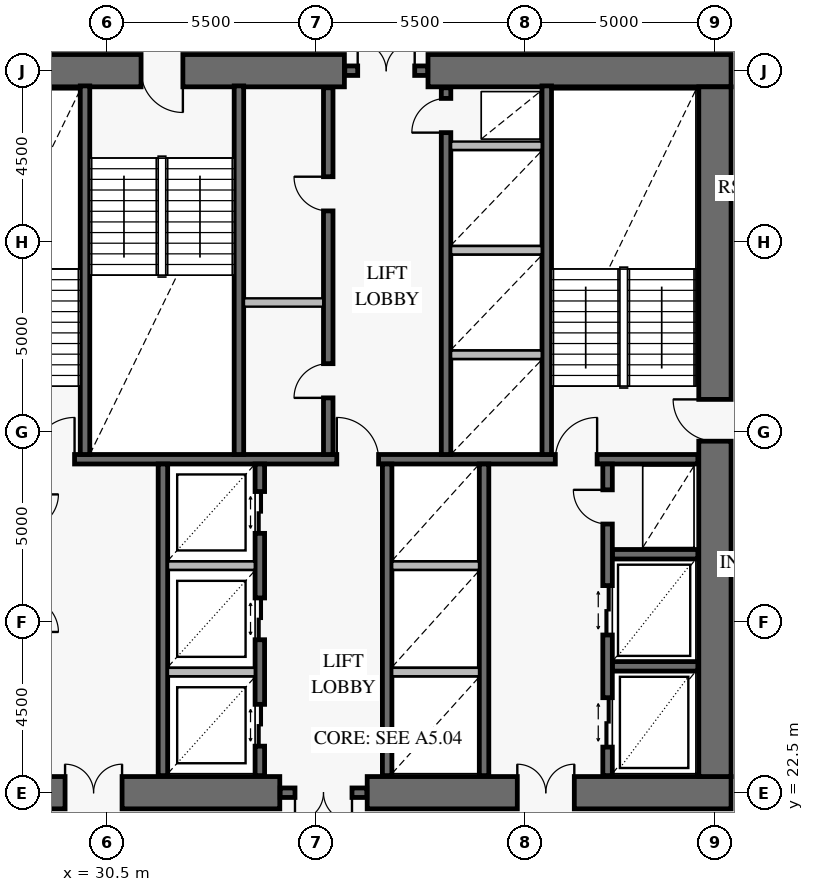
"""IFC4 building model, lengths in metres.
Left out: names, types, materials, properties, quantities, classifications, styles, units other than length and angle.
Written with IfcOpenShell. Run it as: python <this file> out.ifc"""

import sys

from ifc_helpers import new_model, si_unit, direction, frame, frame_2d, origin, place, context, subcontext, project, spatial, rectangle, extrude, element, fill, save


model = new_model("IFC4")
c1 = context("Model", 3, precision=1e-05, world=origin(), true_north=direction((0.0, 1.0)))
c2 = subcontext(c1, "Body", "Model", "MODEL_VIEW")
j1 = project(units=[si_unit("LENGTHUNIT", "METRE"), si_unit("PLANEANGLEUNIT", "RADIAN")], contexts=[c1])
p1 = place(None, origin())
s1 = spatial("IfcSite", under=j1, at=p1, CompositionType="ELEMENT")
p2 = place(p1, origin())
s2 = spatial("IfcBuilding", under=s1, at=p2, CompositionType="ELEMENT")
p3 = place(p2, frame((0.0, 0.0, 49.8)))
s3 = spatial("IfcBuildingStorey", under=s2, at=p3, CompositionType="ELEMENT", Elevation=49.8)
p4 = place(p3, frame((25.075, 22.5, 0.0), z_axis=(0.0, 0.0, 1.0), x_axis=(1.0, 0.0, 0.0)))
e1 = element("IfcWall", 1, at=p4, inside=s3, PredefinedType="SHEAR", context=c2, shape_type="SweptSolid", body=[
    extrude(rectangle(XDim=9.975, YDim=0.85, at=frame_2d((4.988, 0.0))), origin(), (0.0, 0.0, 1.0), 4.2),
])
p5 = place(p4, frame((4.325, 0.0, 0.0)))
e2 = element("IfcOpeningElement", 2, at=p5, cuts=e1, PredefinedType="OPENING", context=c2, shape_type="SweptSolid", body=[
    extrude(rectangle(XDim=1.5, YDim=2.15, at=frame_2d((0.75, 1.075))), frame((0.0, 0.437, 0.0), z_axis=(0.0, -1.0, 0.0), x_axis=(1.0, 0.0, 0.0)), (0.0, 0.0, 1.0), 0.874),
])
p6 = place(p3, frame((37.35, 22.5, 0.0), z_axis=(0.0, 0.0, 1.0), x_axis=(1.0, 0.0, 0.0)))
e3 = element("IfcWall", 3, at=p6, inside=s3, PredefinedType="SHEAR", context=c2, shape_type="SweptSolid", body=[
    extrude(rectangle(XDim=9.575, YDim=0.85, at=frame_2d((4.788, 0.0))), origin(), (0.0, 0.0, 1.0), 4.2),
])
p7 = place(p6, frame((3.95, 0.0, 0.0)))
e4 = element("IfcOpeningElement", 4, at=p7, cuts=e3, PredefinedType="OPENING", context=c2, shape_type="SweptSolid", body=[
    extrude(rectangle(XDim=1.5, YDim=2.15, at=frame_2d((0.75, 1.075))), frame((0.0, 0.437, 0.0), z_axis=(0.0, -1.0, 0.0), x_axis=(1.0, 0.0, 0.0)), (0.0, 0.0, 1.0), 0.874),
])
p8 = place(p3, frame((46.925, 41.5, 0.0), z_axis=(0.0, 0.0, 1.0), x_axis=(-1.0, 0.0, 0.0)))
e5 = element("IfcWall", 5, at=p8, inside=s3, PredefinedType="SHEAR", context=c2, shape_type="SweptSolid", body=[
    extrude(rectangle(XDim=7.975, YDim=0.85, at=frame_2d((3.988, 0.0))), origin(), (0.0, 0.0, 1.0), 4.2),
])
p9 = place(p3, frame((36.75, 41.5, 0.0), z_axis=(0.0, 0.0, 1.0), x_axis=(-1.0, 0.0, 0.0)))
e6 = element("IfcWall", 6, at=p9, inside=s3, PredefinedType="SHEAR", context=c2, shape_type="SweptSolid", body=[
    extrude(rectangle(XDim=11.675, YDim=0.85, at=frame_2d((5.837, 0.0))), origin(), (0.0, 0.0, 1.0), 4.2),
])
p10 = place(p9, frame((4.25, 0.0, 0.0)))
e7 = element("IfcOpeningElement", 7, at=p10, cuts=e6, PredefinedType="OPENING", context=c2, shape_type="SweptSolid", body=[
    extrude(rectangle(XDim=1.1, YDim=2.15, at=frame_2d((0.55, 1.075))), frame((0.0, 0.437, 0.0), z_axis=(0.0, -1.0, 0.0), x_axis=(1.0, 0.0, 0.0)), (0.0, 0.0, 1.0), 0.874),
])
p11 = place(p3, frame((46.5, 22.925, 0.0), z_axis=(0.0, 0.0, 1.0), x_axis=(0.0, 1.0, 0.0)))
e8 = element("IfcWall", 8, at=p11, inside=s3, PredefinedType="SHEAR", context=c2, shape_type="SweptSolid", body=[
    extrude(rectangle(XDim=18.15, YDim=0.85, at=frame_2d((9.075, 0.0))), origin(), (0.0, 0.0, 1.0), 4.2),
])
p12 = place(p11, frame((8.825, 0.0, 0.0)))
e9 = element("IfcOpeningElement", 9, at=p12, cuts=e8, PredefinedType="OPENING", context=c2, shape_type="SweptSolid", body=[
    extrude(rectangle(XDim=1.1, YDim=2.15, at=frame_2d((0.55, 1.075))), frame((0.0, 0.437, 0.0), z_axis=(0.0, -1.0, 0.0), x_axis=(1.0, 0.0, 0.0)), (0.0, 0.0, 1.0), 0.874),
])
p13 = place(p3, frame((35.06, 22.5, 0.0), z_axis=(0.0, 0.0, 1.0), x_axis=(1.0, 0.0, 0.0)))
e10 = element("IfcWall", 10, at=p13, inside=s3, PredefinedType="SOLIDWALL", context=c2, shape_type="SweptSolid", body=[
    extrude(rectangle(XDim=2.28, YDim=0.25, at=frame_2d((1.14, 0.0))), origin(), (0.0, 0.0, 1.0), 4.2),
])
p14 = place(p13, frame((0.39, 0.0, 0.0)))
e11 = element("IfcOpeningElement", 11, at=p14, cuts=e10, PredefinedType="OPENING", context=c2, shape_type="SweptSolid", body=[
    extrude(rectangle(XDim=1.5, YDim=2.15, at=frame_2d((0.75, 1.075))), frame((0.0, 0.137, 0.0), z_axis=(0.0, -1.0, 0.0), x_axis=(1.0, 0.0, 0.0)), (0.0, 0.0, 1.0), 0.274),
])
p15 = place(p3, frame((36.76, 41.5, 0.0), z_axis=(0.0, 0.0, 1.0), x_axis=(1.0, 0.0, 0.0)))
e12 = element("IfcWall", 12, at=p15, inside=s3, PredefinedType="SOLIDWALL", context=c2, shape_type="SweptSolid", body=[
    extrude(rectangle(XDim=2.18, YDim=0.25, at=frame_2d((1.09, 0.0))), origin(), (0.0, 0.0, 1.0), 4.2),
])
p16 = place(p15, frame((0.34, 0.0, 0.0)))
e13 = element("IfcOpeningElement", 13, at=p16, cuts=e12, PredefinedType="OPENING", context=c2, shape_type="SweptSolid", body=[
    extrude(rectangle(XDim=1.5, YDim=2.15, at=frame_2d((0.75, 1.075))), frame((0.0, 0.137, 0.0), z_axis=(0.0, -1.0, 0.0), x_axis=(1.0, 0.0, 0.0)), (0.0, 0.0, 1.0), 0.274),
])
p17 = place(p3, frame((25.95, 31.275, 0.0), z_axis=(0.0, 0.0, 1.0), x_axis=(1.0, 0.0, 0.0)))
e14 = element("IfcWall", 14, at=p17, inside=s3, PredefinedType="SOLIDWALL", context=c2, shape_type="SweptSolid", body=[
    extrude(rectangle(XDim=20.1, YDim=0.25, at=frame_2d((10.05, 0.0))), origin(), (0.0, 0.0, 1.0), 4.2),
])
p18 = place(p17, frame((2.6, 0.0, 0.0)))
e15 = element("IfcOpeningElement", 15, at=p18, cuts=e14, PredefinedType="OPENING", context=c2, shape_type="SweptSolid", body=[
    extrude(rectangle(XDim=1.1, YDim=2.15, at=frame_2d((0.55, 1.075))), frame((0.0, 0.137, 0.0), z_axis=(0.0, -1.0, 0.0), x_axis=(1.0, 0.0, 0.0)), (0.0, 0.0, 1.0), 0.274),
])
p19 = place(p17, frame((10.6, 0.0, 0.0)))
e16 = element("IfcOpeningElement", 16, at=p19, cuts=e14, PredefinedType="OPENING", context=c2, shape_type="SweptSolid", body=[
    extrude(rectangle(XDim=1.1, YDim=2.15, at=frame_2d((0.55, 1.075))), frame((0.0, 0.137, 0.0), z_axis=(0.0, -1.0, 0.0), x_axis=(1.0, 0.0, 0.0)), (0.0, 0.0, 1.0), 0.274),
])
p20 = place(p17, frame((16.35, 0.0, 0.0)))
e17 = element("IfcOpeningElement", 17, at=p20, cuts=e14, PredefinedType="OPENING", context=c2, shape_type="SweptSolid", body=[
    extrude(rectangle(XDim=1.1, YDim=2.15, at=frame_2d((0.55, 1.075))), frame((0.0, 0.137, 0.0), z_axis=(0.0, -1.0, 0.0), x_axis=(1.0, 0.0, 0.0)), (0.0, 0.0, 1.0), 0.274),
])
for number, where, z_axis, x_axis in (
    (18, (29.925, 31.4, 0.0), (0.0, 0.0, 1.0), (0.0, 1.0, 0.0)),
    (19, (33.975, 31.4, 0.0), (0.0, 0.0, 1.0), (0.0, 1.0, 0.0)),
    (20, (42.075, 31.4, 0.0), (0.0, 0.0, 1.0), (0.0, 1.0, 0.0)),
):
    element("IfcWall", number, at=place(p3, frame(where, z_axis=z_axis, x_axis=x_axis)), inside=s3, PredefinedType="SOLIDWALL", context=c2, shape_type="SweptSolid", body=[
        extrude(rectangle(XDim=9.7, YDim=0.25, at=frame_2d((4.85, 0.0))), origin(), (0.0, 0.0, 1.0), 4.2),
    ])
p21 = place(p3, frame((36.325, 31.4, 0.0), z_axis=(0.0, 0.0, 1.0), x_axis=(0.0, 1.0, 0.0)))
e21 = element("IfcWall", 21, at=p21, inside=s3, PredefinedType="SOLIDWALL", context=c2, shape_type="SweptSolid", body=[
    extrude(rectangle(XDim=9.65, YDim=0.25, at=frame_2d((4.825, 0.0))), origin(), (0.0, 0.0, 1.0), 4.2),
])
p22 = place(p21, frame((1.49, 0.0, 0.0)))
e22 = element("IfcOpeningElement", 22, at=p22, cuts=e21, PredefinedType="OPENING", context=c2, shape_type="SweptSolid", body=[
    extrude(rectangle(XDim=0.9, YDim=2.1, at=frame_2d((0.45, 1.05))), frame((0.0, 0.137, 0.0), z_axis=(0.0, -1.0, 0.0), x_axis=(1.0, 0.0, 0.0)), (0.0, 0.0, 1.0), 0.274),
])
p23 = place(p21, frame((6.41, 0.0, 0.0)))
e23 = element("IfcOpeningElement", 23, at=p23, cuts=e21, PredefinedType="OPENING", context=c2, shape_type="SweptSolid", body=[
    extrude(rectangle(XDim=0.9, YDim=2.1, at=frame_2d((0.45, 1.05))), frame((0.0, 0.137, 0.0), z_axis=(0.0, -1.0, 0.0), x_axis=(1.0, 0.0, 0.0)), (0.0, 0.0, 1.0), 0.274),
])
p24 = place(p3, frame((39.425, 31.4, 0.0), z_axis=(0.0, 0.0, 1.0), x_axis=(0.0, 1.0, 0.0)))
e24 = element("IfcWall", 24, at=p24, inside=s3, PredefinedType="SOLIDWALL", context=c2, shape_type="SweptSolid", body=[
    extrude(rectangle(XDim=9.65, YDim=0.25, at=frame_2d((4.825, 0.0))), origin(), (0.0, 0.0, 1.0), 4.2),
])
p25 = place(p24, frame((8.47, 0.0, 0.0)))
e25 = element("IfcOpeningElement", 25, at=p25, cuts=e24, PredefinedType="OPENING", context=c2, shape_type="SweptSolid", body=[
    extrude(rectangle(XDim=0.9, YDim=2.1, at=frame_2d((0.45, 1.05))), frame((0.0, 0.137, 0.0), z_axis=(0.0, -1.0, 0.0), x_axis=(1.0, 0.0, 0.0)), (0.0, 0.0, 1.0), 0.274),
])
p26 = place(p3, frame((31.975, 22.95, 0.0), z_axis=(0.0, 0.0, 1.0), x_axis=(0.0, 1.0, 0.0)))
e26 = element("IfcWall", 26, at=p26, inside=s3, PredefinedType="SOLIDWALL", context=c2, shape_type="SweptSolid", body=[
    extrude(rectangle(XDim=8.2, YDim=0.25, at=frame_2d((4.1, 0.0))), origin(), (0.0, 0.0, 1.0), 4.2),
])
p27 = place(p3, frame((34.525, 22.95, 0.0), z_axis=(0.0, 0.0, 1.0), x_axis=(0.0, 1.0, 0.0)))
e27 = element("IfcWall", 27, at=p27, inside=s3, PredefinedType="SOLIDWALL", context=c2, shape_type="SweptSolid", body=[
    extrude(rectangle(XDim=8.2, YDim=0.25, at=frame_2d((4.1, 0.0))), origin(), (0.0, 0.0, 1.0), 4.2),
])
p28 = place(p27, frame((0.775, 0.0, 0.0)))
e28 = element("IfcOpeningElement", 28, at=p28, cuts=e27, PredefinedType="OPENING", context=c2, shape_type="SweptSolid", body=[
    extrude(rectangle(XDim=1.1, YDim=2.2, at=frame_2d((0.55, 1.1))), frame((0.0, 0.137, 0.0), z_axis=(0.0, -1.0, 0.0), x_axis=(1.0, 0.0, 0.0)), (0.0, 0.0, 1.0), 0.274),
])
p29 = place(p27, frame((3.575, 0.0, 0.0)))
e29 = element("IfcOpeningElement", 29, at=p29, cuts=e27, PredefinedType="OPENING", context=c2, shape_type="SweptSolid", body=[
    extrude(rectangle(XDim=1.1, YDim=2.2, at=frame_2d((0.55, 1.1))), frame((0.0, 0.137, 0.0), z_axis=(0.0, -1.0, 0.0), x_axis=(1.0, 0.0, 0.0)), (0.0, 0.0, 1.0), 0.274),
])
p30 = place(p27, frame((6.375, 0.0, 0.0)))
e30 = element("IfcOpeningElement", 30, at=p30, cuts=e27, PredefinedType="OPENING", context=c2, shape_type="SweptSolid", body=[
    extrude(rectangle(XDim=1.1, YDim=2.2, at=frame_2d((0.55, 1.1))), frame((0.0, 0.137, 0.0), z_axis=(0.0, -1.0, 0.0), x_axis=(1.0, 0.0, 0.0)), (0.0, 0.0, 1.0), 0.274),
])
for number, where, z_axis, x_axis in (
    (31, (37.875, 22.95, 0.0), (0.0, 0.0, 1.0), (0.0, 1.0, 0.0)),
    (32, (40.425, 22.95, 0.0), (0.0, 0.0, 1.0), (0.0, 1.0, 0.0)),
):
    element("IfcWall", number, at=place(p3, frame(where, z_axis=z_axis, x_axis=x_axis)), inside=s3, PredefinedType="SOLIDWALL", context=c2, shape_type="SweptSolid", body=[
        extrude(rectangle(XDim=8.2, YDim=0.25, at=frame_2d((4.1, 0.0))), origin(), (0.0, 0.0, 1.0), 4.2),
    ])
for number, where, z_axis, x_axis in (
    (33, (43.8, 25.825, 0.0), (0.0, 0.0, 1.0), (1.0, 0.0, 0.0)),
    (34, (43.8, 28.775, 0.0), (0.0, 0.0, 1.0), (1.0, 0.0, 0.0)),
):
    element("IfcWall", number, at=place(p3, frame(where, z_axis=z_axis, x_axis=x_axis)), inside=s3, PredefinedType="SOLIDWALL", context=c2, shape_type="SweptSolid", body=[
        extrude(rectangle(XDim=2.25, YDim=0.25, at=frame_2d((1.125, 0.0))), origin(), (0.0, 0.0, 1.0), 4.2),
    ])
p31 = place(p3, frame((43.675, 22.95, 0.0), z_axis=(0.0, 0.0, 1.0), x_axis=(0.0, 1.0, 0.0)))
e35 = element("IfcWall", 35, at=p31, inside=s3, PredefinedType="SOLIDWALL", context=c2, shape_type="SweptSolid", body=[
    extrude(rectangle(XDim=8.2, YDim=0.25, at=frame_2d((4.1, 0.0))), origin(), (0.0, 0.0, 1.0), 4.2),
])
p32 = place(p31, frame((0.75, 0.0, 0.0)))
e36 = element("IfcOpeningElement", 36, at=p32, cuts=e35, PredefinedType="OPENING", context=c2, shape_type="SweptSolid", body=[
    extrude(rectangle(XDim=1.3, YDim=2.3, at=frame_2d((0.65, 1.15))), frame((0.0, 0.137, 0.0), z_axis=(0.0, -1.0, 0.0), x_axis=(1.0, 0.0, 0.0)), (0.0, 0.0, 1.0), 0.274),
])
p33 = place(p31, frame((3.7, 0.0, 0.0)))
e37 = element("IfcOpeningElement", 37, at=p33, cuts=e35, PredefinedType="OPENING", context=c2, shape_type="SweptSolid", body=[
    extrude(rectangle(XDim=1.3, YDim=2.3, at=frame_2d((0.65, 1.15))), frame((0.0, 0.137, 0.0), z_axis=(0.0, -1.0, 0.0), x_axis=(1.0, 0.0, 0.0)), (0.0, 0.0, 1.0), 0.274),
])
p34 = place(p31, frame((6.62, 0.0, 0.0)))
e38 = element("IfcOpeningElement", 38, at=p34, cuts=e35, PredefinedType="OPENING", context=c2, shape_type="SweptSolid", body=[
    extrude(rectangle(XDim=0.9, YDim=2.1, at=frame_2d((0.45, 1.05))), frame((0.0, 0.137, 0.0), z_axis=(0.0, -1.0, 0.0), x_axis=(1.0, 0.0, 0.0)), (0.0, 0.0, 1.0), 0.274),
])
p35 = place(p3, frame((34.108, 35.4, 0.0), z_axis=(0.0, 0.0, 1.0), x_axis=(1.0, 0.0, 0.0)))
e39 = element("IfcWall", 39, at=p35, inside=s3, PredefinedType="PARTITIONING", context=c2, shape_type="SweptSolid", body=[
    extrude(rectangle(XDim=2.084, YDim=0.22, at=frame_2d((1.042, 0.0))), origin(), (0.0, 0.0, 1.0), 3.92),
])
for number, where, z_axis, x_axis in (
    (40, (39.558, 34.025, 0.0), (0.0, 0.0, 1.0), (1.0, 0.0, 0.0)),
    (41, (39.558, 36.775, 0.0), (0.0, 0.0, 1.0), (1.0, 0.0, 0.0)),
    (42, (39.558, 39.525, 0.0), (0.0, 0.0, 1.0), (1.0, 0.0, 0.0)),
):
    element("IfcWall", number, at=place(p3, frame(where, z_axis=z_axis, x_axis=x_axis)), inside=s3, PredefinedType="PARTITIONING", context=c2, shape_type="SweptSolid", body=[
        extrude(rectangle(XDim=2.384, YDim=0.22, at=frame_2d((1.192, 0.0))), origin(), (0.0, 0.0, 1.0), 3.92),
    ])
for number, where, z_axis, x_axis in (
    (43, (32.108, 25.675, 0.0), (0.0, 0.0, 1.0), (1.0, 0.0, 0.0)),
    (44, (32.108, 28.475, 0.0), (0.0, 0.0, 1.0), (1.0, 0.0, 0.0)),
):
    element("IfcWall", number, at=place(p3, frame(where, z_axis=z_axis, x_axis=x_axis)), inside=s3, PredefinedType="PARTITIONING", context=c2, shape_type="SweptSolid", body=[
        extrude(rectangle(XDim=2.284, YDim=0.22, at=frame_2d((1.142, 0.0))), origin(), (0.0, 0.0, 1.0), 3.92),
    ])
for number, where, z_axis, x_axis in (
    (45, (38.008, 25.675, 0.0), (0.0, 0.0, 1.0), (1.0, 0.0, 0.0)),
    (46, (38.008, 28.475, 0.0), (0.0, 0.0, 1.0), (1.0, 0.0, 0.0)),
):
    element("IfcWall", number, at=place(p3, frame(where, z_axis=z_axis, x_axis=x_axis)), inside=s3, PredefinedType="PARTITIONING", context=c2, shape_type="SweptSolid", body=[
        extrude(rectangle(XDim=2.284, YDim=0.22, at=frame_2d((1.142, 0.0))), origin(), (0.0, 0.0, 1.0), 3.92),
    ])
p36 = place(p12, origin())
e47 = element("IfcDoor", 47, at=p36, inside=s3, OperationType="SINGLE_SWING_RIGHT", PredefinedType="USERDEFINED", context=c2, shape_type="SweptSolid", body=[
    extrude(rectangle(XDim=1.1, YDim=2.15, at=frame_2d((0.55, 1.075))), frame((0.0, 0.025, 0.0), z_axis=(0.0, -1.0, 0.0), x_axis=(1.0, 0.0, 0.0)), (0.0, 0.0, 1.0), 0.05),
])
fill(e9, e47)
p37 = place(p10, origin())
e48 = element("IfcDoor", 48, at=p37, inside=s3, OperationType="SINGLE_SWING_LEFT", PredefinedType="USERDEFINED", context=c2, shape_type="SweptSolid", body=[
    extrude(rectangle(XDim=1.1, YDim=2.15, at=frame_2d((0.55, 1.075))), frame((0.0, 0.025, 0.0), z_axis=(0.0, -1.0, 0.0), x_axis=(1.0, 0.0, 0.0)), (0.0, 0.0, 1.0), 0.05),
])
fill(e7, e48)
p38 = place(p5, origin())
e49 = element("IfcDoor", 49, at=p38, inside=s3, OperationType="DOUBLE_DOOR_SINGLE_SWING", PredefinedType="DOOR", context=c2, shape_type="SweptSolid", body=[
    extrude(rectangle(XDim=1.5, YDim=2.15, at=frame_2d((0.75, 1.075))), frame((0.0, 0.025, 0.0), z_axis=(0.0, -1.0, 0.0), x_axis=(1.0, 0.0, 0.0)), (0.0, 0.0, 1.0), 0.05),
])
fill(e2, e49)
p39 = place(p7, origin())
e50 = element("IfcDoor", 50, at=p39, inside=s3, OperationType="DOUBLE_DOOR_SINGLE_SWING", PredefinedType="DOOR", context=c2, shape_type="SweptSolid", body=[
    extrude(rectangle(XDim=1.5, YDim=2.15, at=frame_2d((0.75, 1.075))), frame((0.0, 0.025, 0.0), z_axis=(0.0, -1.0, 0.0), x_axis=(1.0, 0.0, 0.0)), (0.0, 0.0, 1.0), 0.05),
])
fill(e4, e50)
p40 = place(p14, frame((1.5, 0.0, 0.0), z_axis=(0.0, 0.0, 1.0), x_axis=(-1.0, 0.0, 0.0)))
e51 = element("IfcDoor", 51, at=p40, inside=s3, OperationType="DOUBLE_DOOR_SINGLE_SWING", PredefinedType="DOOR", context=c2, shape_type="SweptSolid", body=[
    extrude(rectangle(XDim=1.5, YDim=2.15, at=frame_2d((0.75, 1.075))), frame((0.0, 0.025, 0.0), z_axis=(0.0, -1.0, 0.0), x_axis=(1.0, 0.0, 0.0)), (0.0, 0.0, 1.0), 0.05),
])
fill(e11, e51)
p41 = place(p16, origin())
e52 = element("IfcDoor", 52, at=p41, inside=s3, OperationType="DOUBLE_DOOR_SINGLE_SWING", PredefinedType="DOOR", context=c2, shape_type="SweptSolid", body=[
    extrude(rectangle(XDim=1.5, YDim=2.15, at=frame_2d((0.75, 1.075))), frame((0.0, 0.025, 0.0), z_axis=(0.0, -1.0, 0.0), x_axis=(1.0, 0.0, 0.0)), (0.0, 0.0, 1.0), 0.05),
])
fill(e13, e52)
p42 = place(p18, origin())
e53 = element("IfcDoor", 53, at=p42, inside=s3, OperationType="SINGLE_SWING_RIGHT", PredefinedType="USERDEFINED", context=c2, shape_type="SweptSolid", body=[
    extrude(rectangle(XDim=1.1, YDim=2.15, at=frame_2d((0.55, 1.075))), frame((0.0, 0.025, 0.0), z_axis=(0.0, -1.0, 0.0), x_axis=(1.0, 0.0, 0.0)), (0.0, 0.0, 1.0), 0.05),
])
fill(e15, e53)
p43 = place(p19, origin())
e54 = element("IfcDoor", 54, at=p43, inside=s3, OperationType="SINGLE_SWING_LEFT", PredefinedType="USERDEFINED", context=c2, shape_type="SweptSolid", body=[
    extrude(rectangle(XDim=1.1, YDim=2.15, at=frame_2d((0.55, 1.075))), frame((0.0, 0.025, 0.0), z_axis=(0.0, -1.0, 0.0), x_axis=(1.0, 0.0, 0.0)), (0.0, 0.0, 1.0), 0.05),
])
fill(e16, e54)
p44 = place(p20, origin())
e55 = element("IfcDoor", 55, at=p44, inside=s3, OperationType="SINGLE_SWING_RIGHT", PredefinedType="USERDEFINED", context=c2, shape_type="SweptSolid", body=[
    extrude(rectangle(XDim=1.1, YDim=2.15, at=frame_2d((0.55, 1.075))), frame((0.0, 0.025, 0.0), z_axis=(0.0, -1.0, 0.0), x_axis=(1.0, 0.0, 0.0)), (0.0, 0.0, 1.0), 0.05),
])
fill(e17, e55)
p45 = place(p22, origin())
e56 = element("IfcDoor", 56, at=p45, inside=s3, OperationType="SINGLE_SWING_LEFT", PredefinedType="DOOR", context=c2, shape_type="SweptSolid", body=[
    extrude(rectangle(XDim=0.9, YDim=2.1, at=frame_2d((0.45, 1.05))), frame((0.0, 0.025, 0.0), z_axis=(0.0, -1.0, 0.0), x_axis=(1.0, 0.0, 0.0)), (0.0, 0.0, 1.0), 0.05),
])
fill(e22, e56)
p46 = place(p23, origin())
e57 = element("IfcDoor", 57, at=p46, inside=s3, OperationType="SINGLE_SWING_RIGHT", PredefinedType="DOOR", context=c2, shape_type="SweptSolid", body=[
    extrude(rectangle(XDim=0.9, YDim=2.1, at=frame_2d((0.45, 1.05))), frame((0.0, 0.025, 0.0), z_axis=(0.0, -1.0, 0.0), x_axis=(1.0, 0.0, 0.0)), (0.0, 0.0, 1.0), 0.05),
])
fill(e23, e57)
p47 = place(p25, origin())
e58 = element("IfcDoor", 58, at=p47, inside=s3, OperationType="SINGLE_SWING_LEFT", PredefinedType="DOOR", context=c2, shape_type="SweptSolid", body=[
    extrude(rectangle(XDim=0.9, YDim=2.1, at=frame_2d((0.45, 1.05))), frame((0.0, 0.025, 0.0), z_axis=(0.0, -1.0, 0.0), x_axis=(1.0, 0.0, 0.0)), (0.0, 0.0, 1.0), 0.05),
])
fill(e25, e58)
p48 = place(p28, frame((1.1, 0.0, 0.0), z_axis=(0.0, 0.0, 1.0), x_axis=(-1.0, 0.0, 0.0)))
e59 = element("IfcDoor", 59, at=p48, inside=s3, OperationType="DOUBLE_DOOR_SLIDING", PredefinedType="DOOR", context=c2, shape_type="SweptSolid", body=[
    extrude(rectangle(XDim=1.1, YDim=2.2, at=frame_2d((0.55, 1.1))), frame((0.0, 0.025, 0.0), z_axis=(0.0, -1.0, 0.0), x_axis=(1.0, 0.0, 0.0)), (0.0, 0.0, 1.0), 0.05),
])
fill(e28, e59)
p49 = place(p29, frame((1.1, 0.0, 0.0), z_axis=(0.0, 0.0, 1.0), x_axis=(-1.0, 0.0, 0.0)))
e60 = element("IfcDoor", 60, at=p49, inside=s3, OperationType="DOUBLE_DOOR_SLIDING", PredefinedType="DOOR", context=c2, shape_type="SweptSolid", body=[
    extrude(rectangle(XDim=1.1, YDim=2.2, at=frame_2d((0.55, 1.1))), frame((0.0, 0.025, 0.0), z_axis=(0.0, -1.0, 0.0), x_axis=(1.0, 0.0, 0.0)), (0.0, 0.0, 1.0), 0.05),
])
fill(e29, e60)
p50 = place(p30, frame((1.1, 0.0, 0.0), z_axis=(0.0, 0.0, 1.0), x_axis=(-1.0, 0.0, 0.0)))
e61 = element("IfcDoor", 61, at=p50, inside=s3, OperationType="DOUBLE_DOOR_SLIDING", PredefinedType="DOOR", context=c2, shape_type="SweptSolid", body=[
    extrude(rectangle(XDim=1.1, YDim=2.2, at=frame_2d((0.55, 1.1))), frame((0.0, 0.025, 0.0), z_axis=(0.0, -1.0, 0.0), x_axis=(1.0, 0.0, 0.0)), (0.0, 0.0, 1.0), 0.05),
])
fill(e30, e61)
p51 = place(p32, origin())
e62 = element("IfcDoor", 62, at=p51, inside=s3, OperationType="DOUBLE_DOOR_SLIDING", PredefinedType="DOOR", context=c2, shape_type="SweptSolid", body=[
    extrude(rectangle(XDim=1.3, YDim=2.3, at=frame_2d((0.65, 1.15))), frame((0.0, 0.025, 0.0), z_axis=(0.0, -1.0, 0.0), x_axis=(1.0, 0.0, 0.0)), (0.0, 0.0, 1.0), 0.05),
])
fill(e36, e62)
p52 = place(p33, origin())
e63 = element("IfcDoor", 63, at=p52, inside=s3, OperationType="DOUBLE_DOOR_SLIDING", PredefinedType="DOOR", context=c2, shape_type="SweptSolid", body=[
    extrude(rectangle(XDim=1.3, YDim=2.3, at=frame_2d((0.65, 1.15))), frame((0.0, 0.025, 0.0), z_axis=(0.0, -1.0, 0.0), x_axis=(1.0, 0.0, 0.0)), (0.0, 0.0, 1.0), 0.05),
])
fill(e37, e63)
p53 = place(p34, origin())
e64 = element("IfcDoor", 64, at=p53, inside=s3, OperationType="SINGLE_SWING_RIGHT", PredefinedType="DOOR", context=c2, shape_type="SweptSolid", body=[
    extrude(rectangle(XDim=0.9, YDim=2.1, at=frame_2d((0.45, 1.05))), frame((0.0, 0.025, 0.0), z_axis=(0.0, -1.0, 0.0), x_axis=(1.0, 0.0, 0.0)), (0.0, 0.0, 1.0), 0.05),
])
fill(e38, e64)
save(model, sys.argv[1])
